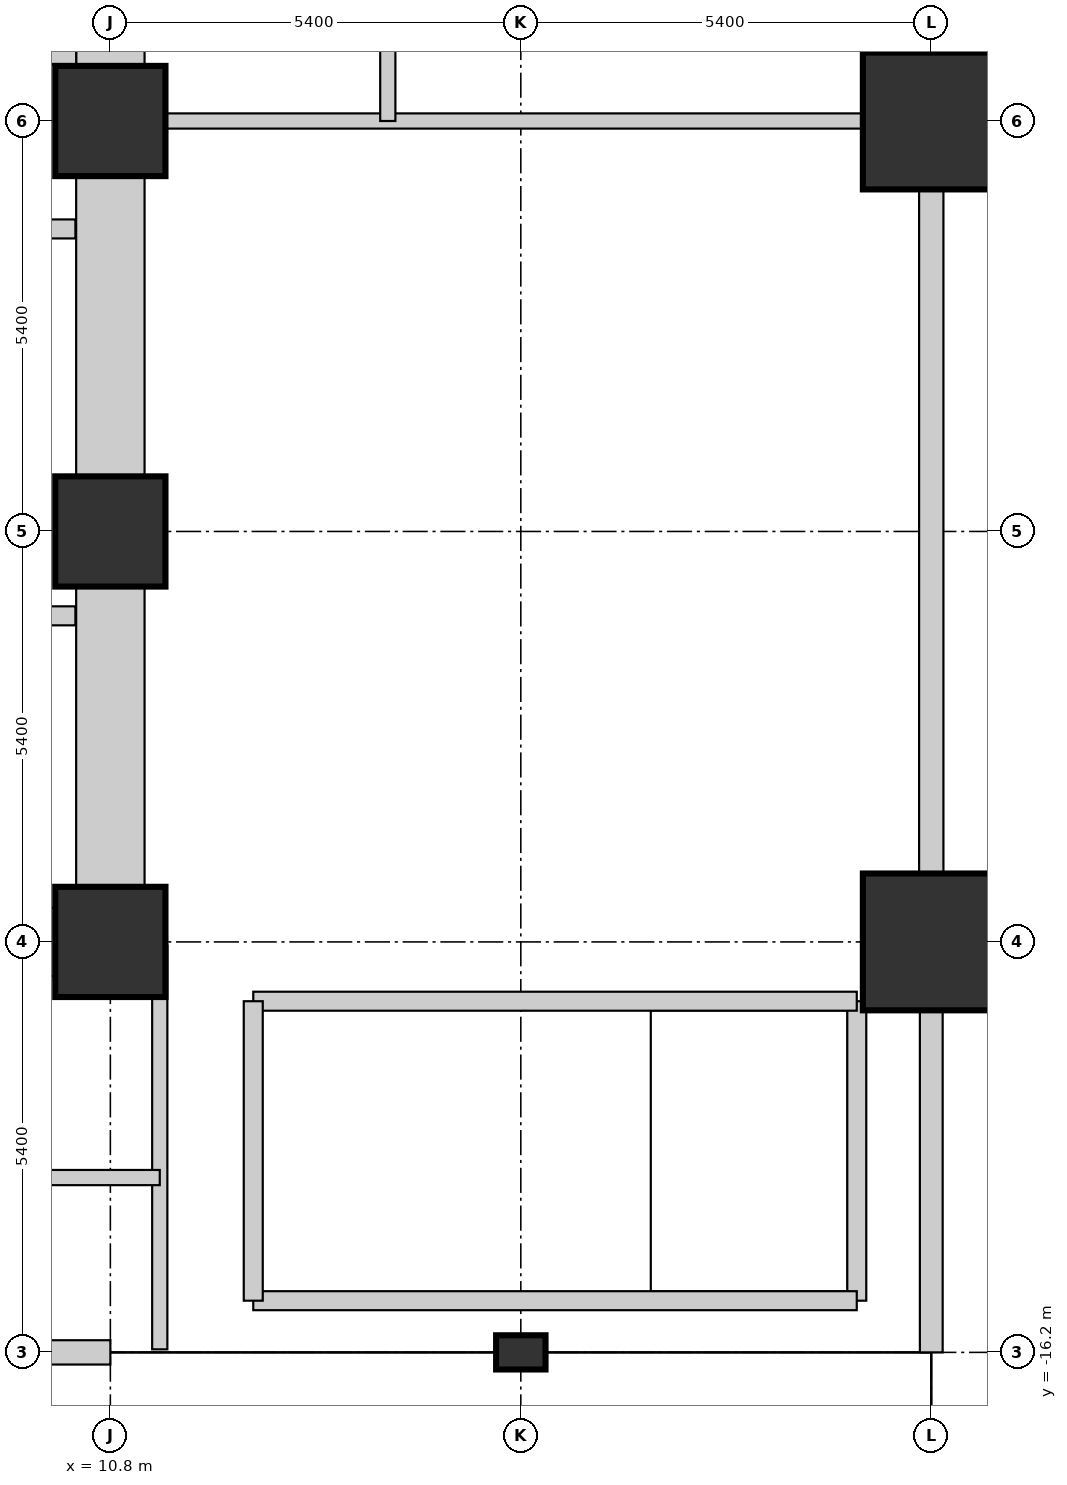
"""IFC4 building model, lengths in metres.
Left out: names, types, materials, properties, quantities, classifications, styles, units other than length and angle.
Written with IfcOpenShell. Run it as: python <this file> out.ifc"""

import sys

from ifc_helpers import new_model, si_unit, direction, frame, frame_2d, origin, origin_2d, place, context, subcontext, project, spatial, rectangle, circle, extrude, element, fill, save


model = new_model("IFC4")
c1 = context("Model", 3, precision=1e-05, world=origin(), true_north=direction((0.0, 1.0)))
c2 = subcontext(c1, "Body", "Model", "MODEL_VIEW")
j1 = project(units=[si_unit("LENGTHUNIT", "METRE"), si_unit("PLANEANGLEUNIT", "RADIAN")], contexts=[c1])
p1 = place(None, origin())
s1 = spatial("IfcSite", under=j1, at=p1, CompositionType="ELEMENT")
p2 = place(p1, origin())
s2 = spatial("IfcBuilding", under=s1, at=p2, CompositionType="ELEMENT")
p3 = place(p2, origin())
s3 = spatial("IfcBuildingStorey", under=s2, at=p3, CompositionType="ELEMENT", Elevation=0.0)
for number, where, z_axis, x_axis in (
    (1, (10.8, -10.8, 0.0), (0.0, 0.0, 1.0), (1.0, 0.0, 0.0)),
    (2, (10.8, -5.4, 0.0), (0.0, 0.0, 1.0), (1.0, 0.0, 0.0)),
    (3, (10.8, 0.0, 0.0), (0.0, 0.0, 1.0), (1.0, 0.0, 0.0)),
):
    element("IfcColumn", number, at=place(p3, frame(where, z_axis=z_axis, x_axis=x_axis)), inside=s3, PredefinedType="COLUMN", context=c2, shape_type="SweptSolid", body=[
        extrude(rectangle(XDim=1.45, YDim=1.45, at=origin_2d()), origin(), (0.0, 0.0, 1.0), 4.5),
    ])
for number, where, z_axis, x_axis in (
    (4, (21.6, -10.8, 0.0), (0.0, 0.0, 1.0), (1.0, 0.0, 0.0)),
    (5, (21.6, 0.0, 0.0), (0.0, 0.0, 1.0), (1.0, 0.0, 0.0)),
):
    element("IfcColumn", number, at=place(p3, frame(where, z_axis=z_axis, x_axis=x_axis)), inside=s3, PredefinedType="COLUMN", context=c2, shape_type="SweptSolid", body=[
        extrude(circle(Radius=0.9, at=origin_2d()), origin(), (0.0, 0.0, 1.0), 4.5),
    ])
p4 = place(p3, frame((16.2, -16.2, 0.0), z_axis=(0.0, 0.0, 1.0), x_axis=(1.0, 0.0, 0.0)))
e6 = element("IfcColumn", 6, at=p4, inside=s3, PredefinedType="PILASTER", context=c2, shape_type="SweptSolid", body=[
    extrude(rectangle(XDim=0.65, YDim=0.45, at=origin_2d()), origin(), (0.0, 0.0, 1.0), 4.5),
])
p5 = place(p3, frame((10.8, -10.065, 0.0), z_axis=(0.0, 0.0, 1.0), x_axis=(0.0, 1.0, 0.0)))
e7 = element("IfcWall", 7, at=p5, inside=s3, PredefinedType="SHEAR", context=c2, shape_type="SweptSolid", body=[
    extrude(rectangle(XDim=3.93, YDim=0.9, at=frame_2d((1.965, 0.0))), origin(), (0.0, 0.0, 1.0), 4.5),
])
p6 = place(p3, frame((10.8, -4.665, 0.0), z_axis=(0.0, 0.0, 1.0), x_axis=(0.0, 1.0, 0.0)))
e8 = element("IfcWall", 8, at=p6, inside=s3, PredefinedType="SHEAR", context=c2, shape_type="SweptSolid", body=[
    extrude(rectangle(XDim=3.93, YDim=0.9, at=frame_2d((1.965, 0.0))), origin(), (0.0, 0.0, 1.0), 4.5),
])
p7 = place(p6, frame((1.415, 0.0, 0.0)))
e9 = element("IfcOpeningElement", 9, at=p7, cuts=e8, PredefinedType="OPENING", context=c2, shape_type="SweptSolid", body=[
    extrude(rectangle(XDim=1.1, YDim=2.1, at=frame_2d((0.55, 1.05))), frame((0.0, 0.46, 0.0), z_axis=(0.0, -1.0, 0.0), x_axis=(1.0, 0.0, 0.0)), (0.0, 0.0, 1.0), 0.92),
])
p8 = place(p3, frame((10.8, 0.735, 0.0), z_axis=(0.0, 0.0, 1.0), x_axis=(0.0, 1.0, 0.0)))
e10 = element("IfcWall", 10, at=p8, inside=s3, PredefinedType="SHEAR", context=c2, shape_type="SweptSolid", body=[
    extrude(rectangle(XDim=3.93, YDim=0.9, at=frame_2d((1.965, 0.0))), origin(), (0.0, 0.0, 1.0), 4.5),
])
p9 = place(p8, frame((1.415, 0.0, 0.0)))
e11 = element("IfcOpeningElement", 11, at=p9, cuts=e10, PredefinedType="OPENING", context=c2, shape_type="SweptSolid", body=[
    extrude(rectangle(XDim=1.1, YDim=2.1, at=frame_2d((0.55, 1.05))), frame((0.0, 0.46, 0.0), z_axis=(0.0, -1.0, 0.0), x_axis=(1.0, 0.0, 0.0)), (0.0, 0.0, 1.0), 0.92),
])
p10 = place(p3, frame((6.135, -10.8, 0.0), z_axis=(0.0, 0.0, 1.0), x_axis=(1.0, 0.0, 0.0)))
e12 = element("IfcWall", 12, at=p10, inside=s3, PredefinedType="SHEAR", context=c2, shape_type="SweptSolid", body=[
    extrude(rectangle(XDim=3.93, YDim=0.9, at=frame_2d((1.965, 0.0))), origin(), (0.0, 0.0, 1.0), 4.5),
])
p11 = place(p3, frame((10.8, -16.2, 0.0), z_axis=(0.0, 0.0, 1.0), x_axis=(-1.0, 0.0, 0.0)))
e13 = element("IfcWall", 13, at=p11, inside=s3, PredefinedType="STANDARD", context=c2, shape_type="SweptSolid", body=[
    extrude(rectangle(XDim=10.8, YDim=0.32, at=frame_2d((5.4, 0.0))), origin(), (0.0, 0.0, 1.0), 3.329),
])
p12 = place(p11, frame((4.5, 0.0, 0.0)))
e14 = element("IfcOpeningElement", 14, at=p12, cuts=e13, PredefinedType="OPENING", context=c2, shape_type="SweptSolid", body=[
    extrude(rectangle(XDim=1.8, YDim=2.35, at=frame_2d((0.9, 1.175))), frame((0.0, 0.17, 0.0), z_axis=(0.0, -1.0, 0.0), x_axis=(1.0, 0.0, 0.0)), (0.0, 0.0, 1.0), 0.34),
])
p13 = place(p3, frame((21.6, -0.898, 0.0), z_axis=(0.0, 0.0, 1.0), x_axis=(0.0, -1.0, 0.0)))
e15 = element("IfcWall", 15, at=p13, inside=s3, PredefinedType="STANDARD", context=c2, shape_type="SweptSolid", body=[
    extrude(rectangle(XDim=9.004, YDim=0.32, at=frame_2d((4.502, 0.0))), origin(), (0.0, 0.0, 1.0), 3.329),
])
p14 = place(p13, frame((3.677, 0.0, 0.0)))
e16 = element("IfcOpeningElement", 16, at=p14, cuts=e15, PredefinedType="OPENING", context=c2, shape_type="SweptSolid", body=[
    extrude(rectangle(XDim=1.65, YDim=2.3, at=frame_2d((0.825, 1.15))), frame((0.0, 0.17, 0.0), z_axis=(0.0, -1.0, 0.0), x_axis=(1.0, 0.0, 0.0)), (0.0, 0.0, 1.0), 0.34),
])
p15 = place(p3, frame((21.6, -11.698, 0.0), z_axis=(0.0, 0.0, 1.0), x_axis=(0.0, -1.0, 0.0)))
e17 = element("IfcWall", 17, at=p15, inside=s3, PredefinedType="STANDARD", context=c2, shape_type="SweptSolid", body=[
    extrude(rectangle(XDim=4.502, YDim=0.3, at=frame_2d((2.251, 0.0))), origin(), (0.0, 0.0, 1.0), 3.329),
])
p16 = place(p15, frame((1.401, 0.0, 0.8)))
e18 = element("IfcOpeningElement", 18, at=p16, cuts=e17, PredefinedType="OPENING", context=c2, shape_type="SweptSolid", body=[
    extrude(rectangle(XDim=1.7, YDim=1.85, at=frame_2d((0.85, 0.925))), frame((0.0, 0.16, 0.0), z_axis=(0.0, -1.0, 0.0), x_axis=(1.0, 0.0, 0.0)), (0.0, 0.0, 1.0), 0.32),
])
p17 = place(p3, frame((5.44, -1.42, 0.0), z_axis=(0.0, 0.0, 1.0), x_axis=(1.0, 0.0, 0.0)))
e19 = element("IfcWall", 19, at=p17, inside=s3, PredefinedType="SHEAR", context=c2, shape_type="SweptSolid", body=[
    extrude(rectangle(XDim=4.9, YDim=0.25, at=frame_2d((2.45, 0.0))), origin(), (0.0, 0.0, 1.0), 4.5),
])
p18 = place(p3, frame((5.55, 0.87, 0.0), z_axis=(0.0, 0.0, 1.0), x_axis=(1.0, 0.0, 0.0)))
e20 = element("IfcWall", 20, at=p18, inside=s3, PredefinedType="SHEAR", context=c2, shape_type="SweptSolid", body=[
    extrude(rectangle(XDim=4.8, YDim=0.25, at=frame_2d((2.4, 0.0))), origin(), (0.0, 0.0, 1.0), 4.5),
])
p19 = place(p18, frame((0.65, 0.0, 0.0)))
e21 = element("IfcOpeningElement", 21, at=p19, cuts=e20, PredefinedType="OPENING", context=c2, shape_type="SweptSolid", body=[
    extrude(rectangle(XDim=1.1, YDim=2.1, at=frame_2d((0.55, 1.05))), frame((0.0, 0.135, 0.0), z_axis=(0.0, -1.0, 0.0), x_axis=(1.0, 0.0, 0.0)), (0.0, 0.0, 1.0), 0.27),
])
p20 = place(p18, frame((3.05, 0.0, 0.0)))
e22 = element("IfcOpeningElement", 22, at=p20, cuts=e20, PredefinedType="OPENING", context=c2, shape_type="SweptSolid", body=[
    extrude(rectangle(XDim=1.1, YDim=2.1, at=frame_2d((0.55, 1.05))), frame((0.0, 0.135, 0.0), z_axis=(0.0, -1.0, 0.0), x_axis=(1.0, 0.0, 0.0)), (0.0, 0.0, 1.0), 0.27),
])
p21 = place(p3, frame((2.64, -6.51, 0.0), z_axis=(0.0, 0.0, 1.0), x_axis=(1.0, 0.0, 0.0)))
e23 = element("IfcWall", 23, at=p21, inside=s3, PredefinedType="SHEAR", context=c2, shape_type="SweptSolid", body=[
    extrude(rectangle(XDim=7.7, YDim=0.25, at=frame_2d((3.85, 0.0))), origin(), (0.0, 0.0, 1.0), 4.5),
])
p22 = place(p21, frame((6.0, 0.0, 0.0)))
e24 = element("IfcOpeningElement", 24, at=p22, cuts=e23, PredefinedType="OPENING", context=c2, shape_type="SweptSolid", body=[
    extrude(rectangle(XDim=0.95, YDim=2.1, at=frame_2d((0.475, 1.05))), frame((0.0, 0.135, 0.0), z_axis=(0.0, -1.0, 0.0), x_axis=(1.0, 0.0, 0.0)), (0.0, 0.0, 1.0), 0.27),
])
p23 = place(p3, frame((20.62, -15.52, 0.0), z_axis=(0.0, 0.0, 1.0), x_axis=(0.0, 1.0, 0.0)))
e25 = element("IfcWall", 25, at=p23, inside=s3, PredefinedType="SHEAR", context=c2, shape_type="SweptSolid", body=[
    extrude(rectangle(XDim=3.94, YDim=0.25, at=frame_2d((1.97, 0.0))), origin(), (0.0, 0.0, 1.0), 4.5),
])
for number, where, z_axis, x_axis in (
    (26, (12.68, -11.58, 0.0), (0.0, 0.0, 1.0), (1.0, 0.0, 0.0)),
    (27, (12.68, -15.52, 0.0), (0.0, 0.0, 1.0), (1.0, 0.0, 0.0)),
):
    element("IfcWall", number, at=place(p3, frame(where, z_axis=z_axis, x_axis=x_axis)), inside=s3, PredefinedType="SHEAR", context=c2, shape_type="SweptSolid", body=[
        extrude(rectangle(XDim=7.94, YDim=0.25, at=frame_2d((3.97, 0.0))), origin(), (0.0, 0.0, 1.0), 4.5),
    ])
p24 = place(p3, frame((12.68, -15.52, 0.0), z_axis=(0.0, 0.0, 1.0), x_axis=(0.0, 1.0, 0.0)))
e28 = element("IfcWall", 28, at=p24, inside=s3, PredefinedType="SHEAR", context=c2, shape_type="SweptSolid", body=[
    extrude(rectangle(XDim=3.94, YDim=0.25, at=frame_2d((1.97, 0.0))), origin(), (0.0, 0.0, 1.0), 4.5),
])
p25 = place(p24, frame((1.42, 0.0, 0.0)))
e29 = element("IfcOpeningElement", 29, at=p25, cuts=e28, PredefinedType="OPENING", context=c2, shape_type="SweptSolid", body=[
    extrude(rectangle(XDim=1.1, YDim=2.1, at=frame_2d((0.55, 1.05))), frame((0.0, 0.135, 0.0), z_axis=(0.0, -1.0, 0.0), x_axis=(1.0, 0.0, 0.0)), (0.0, 0.0, 1.0), 0.27),
])
p26 = place(p3, frame((10.85, 0.0, 0.0), z_axis=(0.0, 0.0, 1.0), x_axis=(1.0, 0.0, 0.0)))
e30 = element("IfcWall", 30, at=p26, inside=s3, PredefinedType="PARTITIONING", context=c2, shape_type="SweptSolid", body=[
    extrude(rectangle(XDim=10.71, YDim=0.2, at=frame_2d((5.355, 0.0))), origin(), (0.0, 0.0, 1.0), 2.205),
])
p27 = place(p26, frame((2.25, 0.0, 0.0)))
e31 = element("IfcOpeningElement", 31, at=p27, cuts=e30, PredefinedType="OPENING", context=c2, shape_type="SweptSolid", body=[
    extrude(rectangle(XDim=1.1, YDim=2.1, at=frame_2d((0.55, 1.05))), frame((0.0, 0.11, 0.0), z_axis=(0.0, -1.0, 0.0), x_axis=(1.0, 0.0, 0.0)), (0.0, 0.0, 1.0), 0.22),
])
p28 = place(p3, frame((11.45, -16.16, 0.0), z_axis=(0.0, 0.0, 1.0), x_axis=(0.0, 1.0, 0.0)))
e32 = element("IfcWall", 32, at=p28, inside=s3, PredefinedType="PARTITIONING", context=c2, shape_type="SweptSolid", body=[
    extrude(rectangle(XDim=5.31, YDim=0.2, at=frame_2d((2.655, 0.0))), origin(), (0.0, 0.0, 1.0), 3.329),
])
p29 = place(p3, frame((14.45, 0.0, 0.0), z_axis=(0.0, 0.0, 1.0), x_axis=(0.0, 1.0, 0.0)))
e33 = element("IfcWall", 33, at=p29, inside=s3, PredefinedType="PARTITIONING", context=c2, shape_type="SweptSolid", body=[
    extrude(rectangle(XDim=13.9, YDim=0.2, at=frame_2d((6.95, 0.0))), origin(), (0.0, 0.0, 1.0), 3.329),
])
p30 = place(p29, frame((2.5, 0.0, 0.0)))
e34 = element("IfcOpeningElement", 34, at=p30, cuts=e33, PredefinedType="OPENING", context=c2, shape_type="SweptSolid", body=[
    extrude(rectangle(XDim=1.1, YDim=2.1, at=frame_2d((0.55, 1.05))), frame((0.0, 0.11, 0.0), z_axis=(0.0, -1.0, 0.0), x_axis=(1.0, 0.0, 0.0)), (0.0, 0.0, 1.0), 0.22),
])
p31 = place(p29, frame((9.5, 0.0, 0.0)))
e35 = element("IfcOpeningElement", 35, at=p31, cuts=e33, PredefinedType="OPENING", context=c2, shape_type="SweptSolid", body=[
    extrude(rectangle(XDim=1.1, YDim=2.1, at=frame_2d((0.55, 1.05))), frame((0.0, 0.11, 0.0), z_axis=(0.0, -1.0, 0.0), x_axis=(1.0, 0.0, 0.0)), (0.0, 0.0, 1.0), 0.22),
])
p32 = place(p3, frame((-14.45, -13.9, 0.0), z_axis=(0.0, 0.0, 1.0), x_axis=(1.0, 0.0, 0.0)))
e36 = element("IfcWall", 36, at=p32, inside=s3, PredefinedType="PARTITIONING", context=c2, shape_type="SweptSolid", body=[
    extrude(rectangle(XDim=25.9, YDim=0.2, at=frame_2d((12.95, 0.0))), origin(), (0.0, 0.0, 1.0), 3.329),
])
p33 = place(p32, frame((11.0, 0.0, 0.0)))
e37 = element("IfcOpeningElement", 37, at=p33, cuts=e36, PredefinedType="OPENING", context=c2, shape_type="SweptSolid", body=[
    extrude(rectangle(XDim=1.1, YDim=2.1, at=frame_2d((0.55, 1.05))), frame((0.0, 0.11, 0.0), z_axis=(0.0, -1.0, 0.0), x_axis=(1.0, 0.0, 0.0)), (0.0, 0.0, 1.0), 0.22),
])
p34 = place(p14, origin())
e38 = element("IfcDoor", 38, at=p34, inside=s3, OperationType="DOUBLE_DOOR_SINGLE_SWING", PredefinedType="DOOR", context=c2, shape_type="SweptSolid", body=[
    extrude(rectangle(XDim=1.65, YDim=2.3, at=frame_2d((0.825, 1.15))), frame((0.0, 0.025, 0.0), z_axis=(0.0, -1.0, 0.0), x_axis=(1.0, 0.0, 0.0)), (0.0, 0.0, 1.0), 0.05),
])
fill(e16, e38)
p35 = place(p16, origin())
e39 = element("IfcWindow", 39, at=p35, inside=s3, PartitioningType="SINGLE_PANEL", PredefinedType="WINDOW", context=c2, shape_type="SweptSolid", body=[
    extrude(rectangle(XDim=1.7, YDim=1.85, at=frame_2d((0.85, 0.925))), frame((0.0, 0.03, 0.0), z_axis=(0.0, -1.0, 0.0), x_axis=(1.0, 0.0, 0.0)), (0.0, 0.0, 1.0), 0.06),
])
fill(e18, e39)
p36 = place(p7, origin())
e40 = element("IfcDoor", 40, at=p36, inside=s3, OperationType="SINGLE_SWING_RIGHT", PredefinedType="DOOR", context=c2, shape_type="SweptSolid", body=[
    extrude(rectangle(XDim=1.1, YDim=2.1, at=frame_2d((0.55, 1.05))), frame((0.0, 0.025, 0.0), z_axis=(0.0, -1.0, 0.0), x_axis=(1.0, 0.0, 0.0)), (0.0, 0.0, 1.0), 0.05),
])
fill(e9, e40)
p37 = place(p25, origin())
e41 = element("IfcDoor", 41, at=p37, inside=s3, OperationType="SINGLE_SWING_LEFT", PredefinedType="DOOR", context=c2, shape_type="SweptSolid", body=[
    extrude(rectangle(XDim=1.1, YDim=2.1, at=frame_2d((0.55, 1.05))), frame((0.0, 0.025, 0.0), z_axis=(0.0, -1.0, 0.0), x_axis=(1.0, 0.0, 0.0)), (0.0, 0.0, 1.0), 0.05),
])
fill(e29, e41)
p38 = place(p27, origin())
e42 = element("IfcDoor", 42, at=p38, inside=s3, OperationType="SINGLE_SWING_RIGHT", PredefinedType="DOOR", context=c2, shape_type="SweptSolid", body=[
    extrude(rectangle(XDim=1.1, YDim=2.1, at=frame_2d((0.55, 1.05))), frame((0.0, 0.025, 0.0), z_axis=(0.0, -1.0, 0.0), x_axis=(1.0, 0.0, 0.0)), (0.0, 0.0, 1.0), 0.05),
])
fill(e31, e42)
save(model, sys.argv[1])
